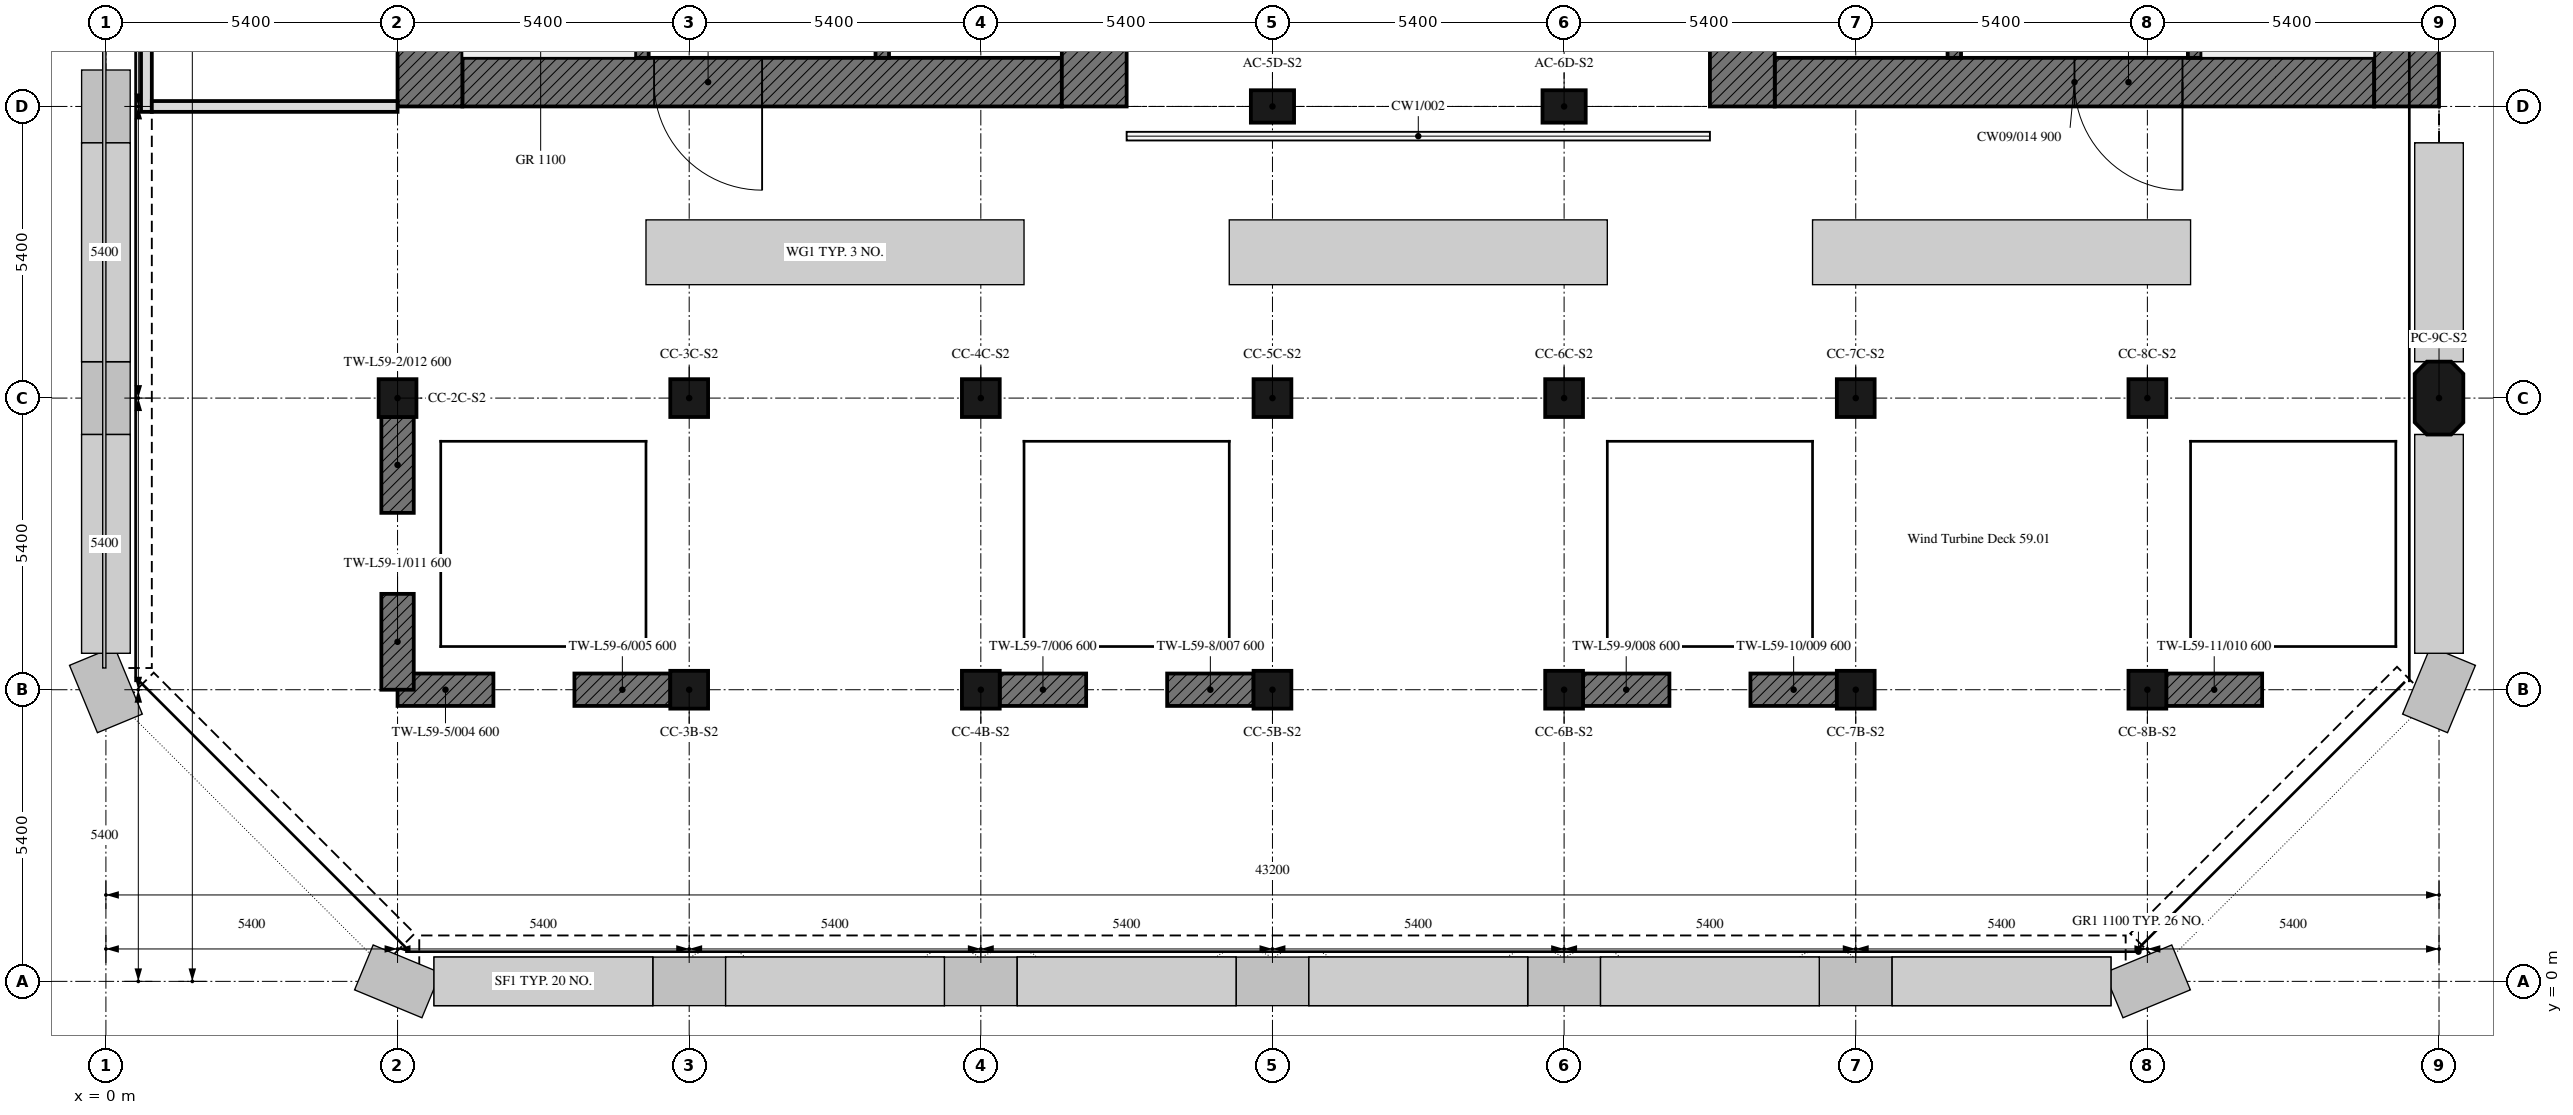
"""IFC4 building model, lengths in metres.
Left out: names, types, materials, properties, quantities, classifications, styles, units other than length and angle.
Written with IfcOpenShell. Run it as: python <this file> out.ifc"""

import sys

from ifc_helpers import new_model, si_unit, direction, frame, frame_2d, origin, origin_2d, place, context, subcontext, project, spatial, polyline, rectangle, outline, extrude, element, fill, save


model = new_model("IFC4")
c1 = context("Model", 3, precision=1e-05, world=origin(), true_north=direction((0.0, 1.0)))
c2 = subcontext(c1, "Body", "Model", "MODEL_VIEW")
j1 = project(units=[si_unit("LENGTHUNIT", "METRE"), si_unit("PLANEANGLEUNIT", "RADIAN")], contexts=[c1])
p1 = place(None, origin())
s1 = spatial("IfcSite", under=j1, at=p1, CompositionType="ELEMENT")
p2 = place(p1, origin())
s2 = spatial("IfcBuilding", under=s1, at=p2, CompositionType="ELEMENT")
p3 = place(p2, frame((0.0, 0.0, 233.5)))
s3 = spatial("IfcBuildingStorey", under=s2, at=p3, CompositionType="ELEMENT", Elevation=233.5)
for number, where, z_axis, x_axis in (
    (1, (10.8, 5.4, 0.0), (0.0, 0.0, 1.0), (1.0, 0.0, 0.0)),
    (2, (16.2, 5.4, 0.0), (0.0, 0.0, 1.0), (1.0, 0.0, 0.0)),
    (3, (21.6, 5.4, 0.0), (0.0, 0.0, 1.0), (1.0, 0.0, 0.0)),
    (4, (27.0, 5.4, 0.0), (0.0, 0.0, 1.0), (1.0, 0.0, 0.0)),
    (5, (32.4, 5.4, 0.0), (0.0, 0.0, 1.0), (1.0, 0.0, 0.0)),
    (6, (37.8, 5.4, 0.0), (0.0, 0.0, 1.0), (1.0, 0.0, 0.0)),
    (7, (5.4, 10.8, 0.0), (0.0, 0.0, 1.0), (1.0, 0.0, 0.0)),
    (8, (10.8, 10.8, 0.0), (0.0, 0.0, 1.0), (1.0, 0.0, 0.0)),
    (9, (16.2, 10.8, 0.0), (0.0, 0.0, 1.0), (1.0, 0.0, 0.0)),
    (10, (21.6, 10.8, 0.0), (0.0, 0.0, 1.0), (1.0, 0.0, 0.0)),
    (11, (27.0, 10.8, 0.0), (0.0, 0.0, 1.0), (1.0, 0.0, 0.0)),
    (12, (32.4, 10.8, 0.0), (0.0, 0.0, 1.0), (1.0, 0.0, 0.0)),
    (13, (37.8, 10.8, 0.0), (0.0, 0.0, 1.0), (1.0, 0.0, 0.0)),
):
    element("IfcColumn", number, at=place(p3, frame(where, z_axis=z_axis, x_axis=x_axis)), inside=s3, PredefinedType="COLUMN", context=c2, shape_type="SweptSolid", body=[
        extrude(rectangle(XDim=0.7, YDim=0.7, at=origin_2d()), origin(), (0.0, 0.0, 1.0), 9.3),
    ])
p4 = place(p3, frame((43.2, 10.8, 0.0), z_axis=(0.0, 0.0, 1.0), x_axis=(0.0, 1.0, 0.0)))
e14 = element("IfcColumn", 14, at=p4, inside=s3, PredefinedType="COLUMN", context=c2, shape_type="SweptSolid", body=[
    extrude(outline(polyline([(-0.45, -0.45), (0.45, -0.45), (0.675, -0.225), (0.675, 0.225), (0.45, 0.45), (-0.45, 0.45), (-0.675, 0.225), (-0.675, -0.225), (-0.45, -0.45)])), origin(), (0.0, 0.0, 1.0), 9.3),
])
for number, where, z_axis, x_axis in (
    (15, (21.6, 16.2, 0.0), (0.0, 0.0, 1.0), (1.0, 0.0, 0.0)),
    (16, (27.0, 16.2, 0.0), (0.0, 0.0, 1.0), (1.0, 0.0, 0.0)),
):
    element("IfcColumn", number, at=place(p3, frame(where, z_axis=z_axis, x_axis=x_axis)), inside=s3, PredefinedType="COLUMN", context=c2, shape_type="SweptSolid", body=[
        extrude(rectangle(XDim=0.8, YDim=0.6, at=origin_2d()), origin(), (0.0, 0.0, 1.0), 9.3),
    ])
p5 = place(p3, frame((5.4, 5.4, 0.0), z_axis=(0.0, 0.0, 1.0), x_axis=(0.0, 1.0, 0.0)))
e17 = element("IfcWall", 17, at=p5, inside=s3, PredefinedType="SHEAR", context=c2, shape_type="SweptSolid", body=[
    extrude(rectangle(XDim=1.775, YDim=0.6, at=frame_2d((0.888, 0.0))), origin(), (0.0, 0.0, 1.0), 9.3),
])
p6 = place(p3, frame((5.4, 8.675, 0.0), z_axis=(0.0, 0.0, 1.0), x_axis=(0.0, 1.0, 0.0)))
e18 = element("IfcWall", 18, at=p6, inside=s3, PredefinedType="SHEAR", context=c2, shape_type="SweptSolid", body=[
    extrude(rectangle(XDim=1.775, YDim=0.6, at=frame_2d((0.887, 0.0))), origin(), (0.0, 0.0, 1.0), 9.3),
])
p7 = place(p3, frame((5.4, 5.4, 0.0), z_axis=(0.0, 0.0, 1.0), x_axis=(1.0, 0.0, 0.0)))
e19 = element("IfcWall", 19, at=p7, inside=s3, PredefinedType="SHEAR", context=c2, shape_type="SweptSolid", body=[
    extrude(rectangle(XDim=1.775, YDim=0.6, at=frame_2d((0.888, 0.0))), origin(), (0.0, 0.0, 1.0), 9.3),
])
p8 = place(p3, frame((8.675, 5.4, 0.0), z_axis=(0.0, 0.0, 1.0), x_axis=(1.0, 0.0, 0.0)))
e20 = element("IfcWall", 20, at=p8, inside=s3, PredefinedType="SHEAR", context=c2, shape_type="SweptSolid", body=[
    extrude(rectangle(XDim=1.775, YDim=0.6, at=frame_2d((0.887, 0.0))), origin(), (0.0, 0.0, 1.0), 9.3),
])
p9 = place(p3, frame((16.55, 5.4, 0.0), z_axis=(0.0, 0.0, 1.0), x_axis=(1.0, 0.0, 0.0)))
e21 = element("IfcWall", 21, at=p9, inside=s3, PredefinedType="SHEAR", context=c2, shape_type="SweptSolid", body=[
    extrude(rectangle(XDim=1.6, YDim=0.6, at=frame_2d((0.8, 0.0))), origin(), (0.0, 0.0, 1.0), 9.3),
])
p10 = place(p3, frame((19.65, 5.4, 0.0), z_axis=(0.0, 0.0, 1.0), x_axis=(1.0, 0.0, 0.0)))
e22 = element("IfcWall", 22, at=p10, inside=s3, PredefinedType="SHEAR", context=c2, shape_type="SweptSolid", body=[
    extrude(rectangle(XDim=1.6, YDim=0.6, at=frame_2d((0.8, 0.0))), origin(), (0.0, 0.0, 1.0), 9.3),
])
p11 = place(p3, frame((27.35, 5.4, 0.0), z_axis=(0.0, 0.0, 1.0), x_axis=(1.0, 0.0, 0.0)))
e23 = element("IfcWall", 23, at=p11, inside=s3, PredefinedType="SHEAR", context=c2, shape_type="SweptSolid", body=[
    extrude(rectangle(XDim=1.6, YDim=0.6, at=frame_2d((0.8, 0.0))), origin(), (0.0, 0.0, 1.0), 9.3),
])
p12 = place(p3, frame((30.45, 5.4, 0.0), z_axis=(0.0, 0.0, 1.0), x_axis=(1.0, 0.0, 0.0)))
e24 = element("IfcWall", 24, at=p12, inside=s3, PredefinedType="SHEAR", context=c2, shape_type="SweptSolid", body=[
    extrude(rectangle(XDim=1.6, YDim=0.6, at=frame_2d((0.8, 0.0))), origin(), (0.0, 0.0, 1.0), 9.3),
])
p13 = place(p3, frame((38.15, 5.4, 0.0), z_axis=(0.0, 0.0, 1.0), x_axis=(1.0, 0.0, 0.0)))
e25 = element("IfcWall", 25, at=p13, inside=s3, PredefinedType="SHEAR", context=c2, shape_type="SweptSolid", body=[
    extrude(rectangle(XDim=1.775, YDim=0.6, at=frame_2d((0.888, 0.0))), origin(), (0.0, 0.0, 1.0), 9.3),
])
p14 = place(p3, frame((17.7, 16.65, 0.0), z_axis=(0.0, 0.0, 1.0), x_axis=(-1.0, 0.0, 0.0)))
e26 = element("IfcWall", 26, at=p14, inside=s3, PredefinedType="SOLIDWALL", context=c2, shape_type="SweptSolid", body=[
    extrude(rectangle(XDim=11.1, YDim=0.9, at=frame_2d((5.55, 0.0))), origin(), (0.0, 0.0, 1.0), 9.3),
])
p15 = place(p14, frame((5.55, 0.0, 0.0)))
e27 = element("IfcOpeningElement", 27, at=p15, cuts=e26, PredefinedType="OPENING", context=c2, shape_type="SweptSolid", body=[
    extrude(rectangle(XDim=2.0, YDim=2.4, at=frame_2d((1.0, 1.2))), frame((0.0, 0.45, 0.0), z_axis=(0.0, -1.0, 0.0), x_axis=(1.0, 0.0, 0.0)), (0.0, 0.0, 1.0), 0.9),
])
for number, where, z_axis, x_axis in (
    (28, (6.0, 16.2, 0.0), (0.0, 0.0, 1.0), (0.0, 1.0, 0.0)),
    (29, (18.3, 32.4, 0.0), (0.0, 0.0, 1.0), (0.0, -1.0, 0.0)),
):
    element("IfcWall", number, at=place(p3, frame(where, z_axis=z_axis, x_axis=x_axis)), inside=s3, PredefinedType="SOLIDWALL", context=c2, shape_type="SweptSolid", body=[
        extrude(rectangle(XDim=16.2, YDim=1.2, at=frame_2d((8.1, 0.0))), origin(), (0.0, 0.0, 1.0), 9.3),
    ])
p16 = place(p3, frame((9.925, 17.1, 0.0), z_axis=(0.0, 0.0, 1.0), x_axis=(0.0, 1.0, 0.0)))
e30 = element("IfcWall", 30, at=p16, inside=s3, PredefinedType="SOLIDWALL", context=c2, shape_type="SweptSolid", body=[
    extrude(rectangle(XDim=14.4, YDim=0.25, at=frame_2d((7.2, 0.0))), origin(), (0.0, 0.0, 1.0), 9.3),
])
p17 = place(p16, frame((4.6, 0.0, 0.0)))
e31 = element("IfcOpeningElement", 31, at=p17, cuts=e30, PredefinedType="OPENING", context=c2, shape_type="SweptSolid", body=[
    extrude(rectangle(XDim=1.0, YDim=2.1, at=frame_2d((0.5, 1.05))), frame((0.0, 0.125, 0.0), z_axis=(0.0, -1.0, 0.0), x_axis=(1.0, 0.0, 0.0)), (0.0, 0.0, 1.0), 0.25),
])
p18 = place(p16, frame((7.062, 0.0, 0.0)))
e32 = element("IfcOpeningElement", 32, at=p18, cuts=e30, PredefinedType="OPENING", context=c2, shape_type="SweptSolid", body=[
    extrude(rectangle(XDim=1.2, YDim=2.1, at=frame_2d((0.6, 1.05))), frame((0.0, 0.125, 0.0), z_axis=(0.0, -1.0, 0.0), x_axis=(1.0, 0.0, 0.0)), (0.0, 0.0, 1.0), 0.25),
])
p19 = place(p16, frame((9.853, 0.0, 0.0)))
e33 = element("IfcOpeningElement", 33, at=p19, cuts=e30, PredefinedType="OPENING", context=c2, shape_type="SweptSolid", body=[
    extrude(rectangle(XDim=0.9, YDim=2.1, at=frame_2d((0.45, 1.05))), frame((0.0, 0.125, 0.0), z_axis=(0.0, -1.0, 0.0), x_axis=(1.0, 0.0, 0.0)), (0.0, 0.0, 1.0), 0.25),
])
p20 = place(p16, frame((11.667, 0.0, 0.0)))
e34 = element("IfcOpeningElement", 34, at=p20, cuts=e30, PredefinedType="OPENING", context=c2, shape_type="SweptSolid", body=[
    extrude(rectangle(XDim=0.9, YDim=2.1, at=frame_2d((0.45, 1.05))), frame((0.0, 0.125, 0.0), z_axis=(0.0, -1.0, 0.0), x_axis=(1.0, 0.0, 0.0)), (0.0, 0.0, 1.0), 0.25),
])
p21 = place(p16, frame((13.227, 0.0, 0.0)))
e35 = element("IfcOpeningElement", 35, at=p21, cuts=e30, PredefinedType="OPENING", context=c2, shape_type="SweptSolid", body=[
    extrude(rectangle(XDim=0.9, YDim=2.1, at=frame_2d((0.45, 1.05))), frame((0.0, 0.125, 0.0), z_axis=(0.0, -1.0, 0.0), x_axis=(1.0, 0.0, 0.0)), (0.0, 0.0, 1.0), 0.25),
])
p22 = place(p3, frame((14.375, 17.1, 0.0), z_axis=(0.0, 0.0, 1.0), x_axis=(0.0, 1.0, 0.0)))
e36 = element("IfcWall", 36, at=p22, inside=s3, PredefinedType="SOLIDWALL", context=c2, shape_type="SweptSolid", body=[
    extrude(rectangle(XDim=14.4, YDim=0.25, at=frame_2d((7.2, 0.0))), origin(), (0.0, 0.0, 1.0), 9.3),
])
p23 = place(p22, frame((13.15, 0.0, 0.0)))
e37 = element("IfcOpeningElement", 37, at=p23, cuts=e36, PredefinedType="OPENING", context=c2, shape_type="SweptSolid", body=[
    extrude(rectangle(XDim=1.0, YDim=2.1, at=frame_2d((0.5, 1.05))), frame((0.0, 0.125, 0.0), z_axis=(0.0, -1.0, 0.0), x_axis=(1.0, 0.0, 0.0)), (0.0, 0.0, 1.0), 0.25),
])
p24 = place(p3, frame((42.0, 16.65, 0.0), z_axis=(0.0, 0.0, 1.0), x_axis=(-1.0, 0.0, 0.0)))
e38 = element("IfcWall", 38, at=p24, inside=s3, PredefinedType="SOLIDWALL", context=c2, shape_type="SweptSolid", body=[
    extrude(rectangle(XDim=11.1, YDim=0.9, at=frame_2d((5.55, 0.0))), origin(), (0.0, 0.0, 1.0), 9.3),
])
p25 = place(p24, frame((3.55, 0.0, 0.0)))
e39 = element("IfcOpeningElement", 39, at=p25, cuts=e38, PredefinedType="OPENING", context=c2, shape_type="SweptSolid", body=[
    extrude(rectangle(XDim=2.0, YDim=2.4, at=frame_2d((1.0, 1.2))), frame((0.0, 0.45, 0.0), z_axis=(0.0, -1.0, 0.0), x_axis=(1.0, 0.0, 0.0)), (0.0, 0.0, 1.0), 0.9),
])
for number, where, z_axis, x_axis in (
    (40, (42.6, 32.4, 0.0), (0.0, 0.0, 1.0), (0.0, -1.0, 0.0)),
    (41, (30.3, 16.2, 0.0), (0.0, 0.0, 1.0), (0.0, 1.0, 0.0)),
):
    element("IfcWall", number, at=place(p3, frame(where, z_axis=z_axis, x_axis=x_axis)), inside=s3, PredefinedType="SOLIDWALL", context=c2, shape_type="SweptSolid", body=[
        extrude(rectangle(XDim=16.2, YDim=1.2, at=frame_2d((8.1, 0.0))), origin(), (0.0, 0.0, 1.0), 9.3),
    ])
p26 = place(p3, frame((38.675, 17.1, 0.0), z_axis=(0.0, 0.0, 1.0), x_axis=(0.0, 1.0, 0.0)))
e42 = element("IfcWall", 42, at=p26, inside=s3, PredefinedType="SOLIDWALL", context=c2, shape_type="SweptSolid", body=[
    extrude(rectangle(XDim=14.4, YDim=0.25, at=frame_2d((7.2, 0.0))), origin(), (0.0, 0.0, 1.0), 9.3),
])
p27 = place(p26, frame((4.6, 0.0, 0.0)))
e43 = element("IfcOpeningElement", 43, at=p27, cuts=e42, PredefinedType="OPENING", context=c2, shape_type="SweptSolid", body=[
    extrude(rectangle(XDim=1.0, YDim=2.1, at=frame_2d((0.5, 1.05))), frame((0.0, 0.125, 0.0), z_axis=(0.0, -1.0, 0.0), x_axis=(1.0, 0.0, 0.0)), (0.0, 0.0, 1.0), 0.25),
])
p28 = place(p26, frame((7.062, 0.0, 0.0)))
e44 = element("IfcOpeningElement", 44, at=p28, cuts=e42, PredefinedType="OPENING", context=c2, shape_type="SweptSolid", body=[
    extrude(rectangle(XDim=1.2, YDim=2.1, at=frame_2d((0.6, 1.05))), frame((0.0, 0.125, 0.0), z_axis=(0.0, -1.0, 0.0), x_axis=(1.0, 0.0, 0.0)), (0.0, 0.0, 1.0), 0.25),
])
p29 = place(p26, frame((9.853, 0.0, 0.0)))
e45 = element("IfcOpeningElement", 45, at=p29, cuts=e42, PredefinedType="OPENING", context=c2, shape_type="SweptSolid", body=[
    extrude(rectangle(XDim=0.9, YDim=2.1, at=frame_2d((0.45, 1.05))), frame((0.0, 0.125, 0.0), z_axis=(0.0, -1.0, 0.0), x_axis=(1.0, 0.0, 0.0)), (0.0, 0.0, 1.0), 0.25),
])
p30 = place(p26, frame((11.667, 0.0, 0.0)))
e46 = element("IfcOpeningElement", 46, at=p30, cuts=e42, PredefinedType="OPENING", context=c2, shape_type="SweptSolid", body=[
    extrude(rectangle(XDim=0.9, YDim=2.1, at=frame_2d((0.45, 1.05))), frame((0.0, 0.125, 0.0), z_axis=(0.0, -1.0, 0.0), x_axis=(1.0, 0.0, 0.0)), (0.0, 0.0, 1.0), 0.25),
])
p31 = place(p26, frame((13.227, 0.0, 0.0)))
e47 = element("IfcOpeningElement", 47, at=p31, cuts=e42, PredefinedType="OPENING", context=c2, shape_type="SweptSolid", body=[
    extrude(rectangle(XDim=0.9, YDim=2.1, at=frame_2d((0.45, 1.05))), frame((0.0, 0.125, 0.0), z_axis=(0.0, -1.0, 0.0), x_axis=(1.0, 0.0, 0.0)), (0.0, 0.0, 1.0), 0.25),
])
p32 = place(p3, frame((34.225, 17.1, 0.0), z_axis=(0.0, 0.0, 1.0), x_axis=(0.0, 1.0, 0.0)))
e48 = element("IfcWall", 48, at=p32, inside=s3, PredefinedType="SOLIDWALL", context=c2, shape_type="SweptSolid", body=[
    extrude(rectangle(XDim=14.4, YDim=0.25, at=frame_2d((7.2, 0.0))), origin(), (0.0, 0.0, 1.0), 9.3),
])
p33 = place(p32, frame((13.15, 0.0, 0.0)))
e49 = element("IfcOpeningElement", 49, at=p33, cuts=e48, PredefinedType="OPENING", context=c2, shape_type="SweptSolid", body=[
    extrude(rectangle(XDim=1.0, YDim=2.1, at=frame_2d((0.5, 1.05))), frame((0.0, 0.125, 0.0), z_axis=(0.0, -1.0, 0.0), x_axis=(1.0, 0.0, 0.0)), (0.0, 0.0, 1.0), 0.25),
])
p34 = place(p3, frame((0.75, 32.3, 0.0), z_axis=(0.0, 0.0, 1.0), x_axis=(0.0, -1.0, 0.0)))
e50 = element("IfcWall", 50, at=p34, inside=s3, PredefinedType="PARTITIONING", context=c2, shape_type="SweptSolid", body=[
    extrude(rectangle(XDim=16.2, YDim=0.2, at=frame_2d((8.1, 0.0))), origin(), (0.0, 0.0, 1.0), 9.3),
])
p35 = place(p3, frame((0.85, 16.2, 0.0), z_axis=(0.0, 0.0, 1.0), x_axis=(1.0, 0.0, 0.0)))
e51 = element("IfcWall", 51, at=p35, inside=s3, PredefinedType="PARTITIONING", context=c2, shape_type="SweptSolid", body=[
    extrude(rectangle(XDim=4.55, YDim=0.2, at=frame_2d((2.275, 0.0))), origin(), (0.0, 0.0, 1.0), 8.55),
])
p36 = place(p15, origin())
e52 = element("IfcDoor", 52, at=p36, inside=s3, OperationType="DOUBLE_DOOR_SINGLE_SWING", PredefinedType="DOOR", context=c2, shape_type="SweptSolid", body=[
    extrude(rectangle(XDim=2.0, YDim=2.4, at=frame_2d((1.0, 1.2))), frame((0.0, 0.025, 0.0), z_axis=(0.0, -1.0, 0.0), x_axis=(1.0, 0.0, 0.0)), (0.0, 0.0, 1.0), 0.05),
])
fill(e27, e52)
p37 = place(p25, origin())
e53 = element("IfcDoor", 53, at=p37, inside=s3, OperationType="DOUBLE_DOOR_SINGLE_SWING", PredefinedType="DOOR", context=c2, shape_type="SweptSolid", body=[
    extrude(rectangle(XDim=2.0, YDim=2.4, at=frame_2d((1.0, 1.2))), frame((0.0, 0.025, 0.0), z_axis=(0.0, -1.0, 0.0), x_axis=(1.0, 0.0, 0.0)), (0.0, 0.0, 1.0), 0.05),
])
fill(e39, e53)
save(model, sys.argv[1])
